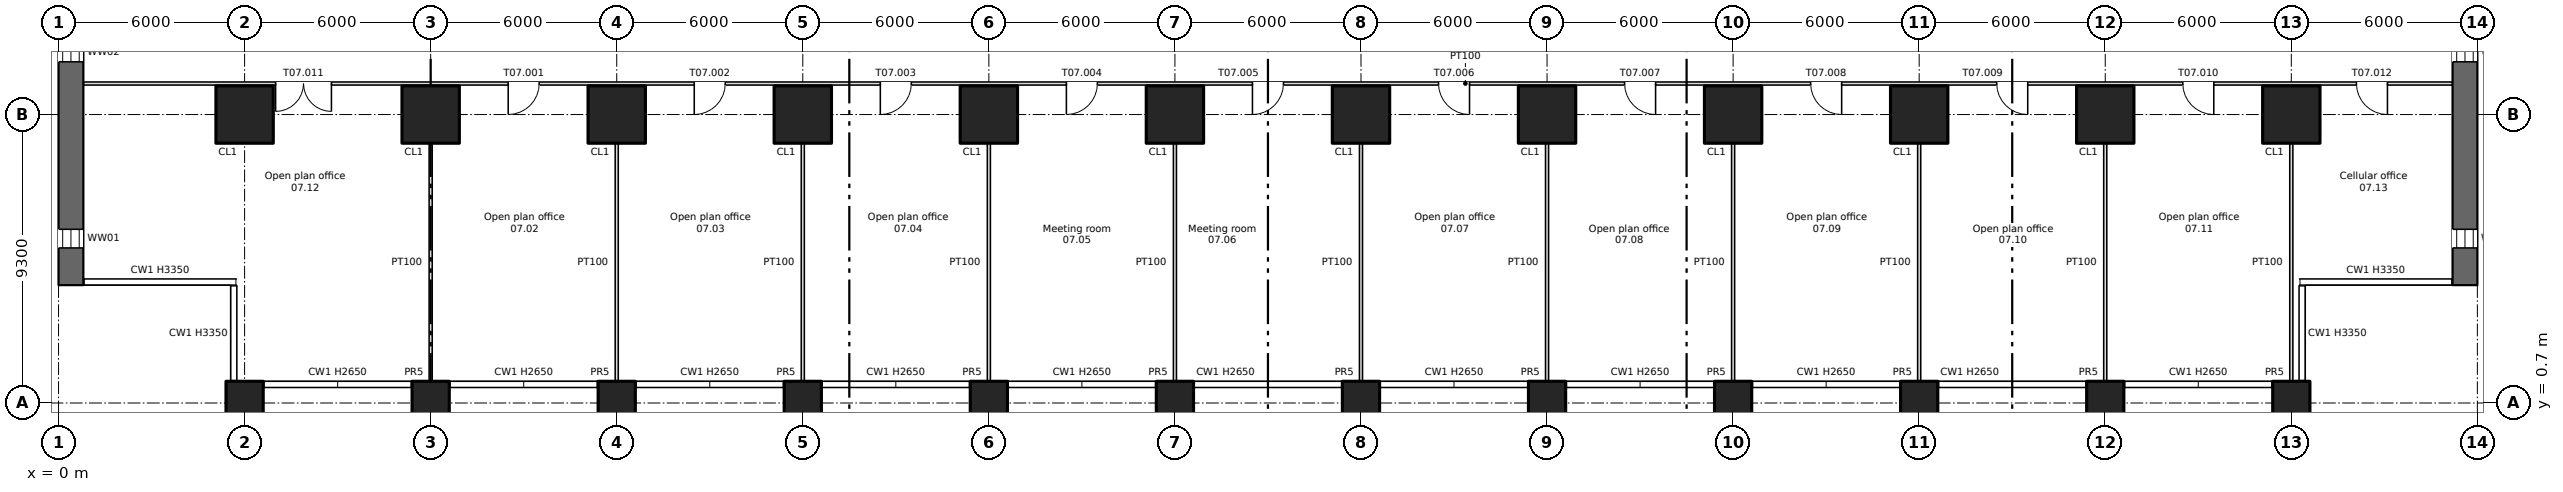
"""IFC4 building model, lengths in metres.
Left out: names, types, materials, properties, quantities, classifications, styles, units other than length and angle.
Written with IfcOpenShell. Run it as: python <this file> out.ifc"""

import sys

from ifc_helpers import new_model, si_unit, direction, frame, frame_2d, origin, origin_2d, place, context, subcontext, project, spatial, rectangle, extrude, element, fill, save


model = new_model("IFC4")
c1 = context("Model", 3, precision=1e-05, world=origin(), true_north=direction((0.0, 1.0)))
c2 = subcontext(c1, "Body", "Model", "MODEL_VIEW")
j1 = project(units=[si_unit("LENGTHUNIT", "METRE"), si_unit("PLANEANGLEUNIT", "RADIAN")], contexts=[c1])
p1 = place(None, origin())
s1 = spatial("IfcSite", under=j1, at=p1, CompositionType="ELEMENT")
p2 = place(p1, origin())
s2 = spatial("IfcBuilding", under=s1, at=p2, CompositionType="ELEMENT")
p3 = place(p2, frame((0.0, 0.0, 26.25)))
s3 = spatial("IfcBuildingStorey", under=s2, at=p3, CompositionType="ELEMENT", Elevation=26.25)
for number, where, z_axis, x_axis in (
    (1, (6.0, 0.7, -0.4), (0.0, 0.0, 1.0), (1.0, 0.0, 0.0)),
    (2, (12.0, 0.7, -0.4), (0.0, 0.0, 1.0), (1.0, 0.0, 0.0)),
    (3, (18.0, 0.7, -0.4), (0.0, 0.0, 1.0), (1.0, 0.0, 0.0)),
    (4, (24.0, 0.7, -0.4), (0.0, 0.0, 1.0), (1.0, 0.0, 0.0)),
    (5, (30.0, 0.7, -0.4), (0.0, 0.0, 1.0), (1.0, 0.0, 0.0)),
    (6, (36.0, 0.7, -0.4), (0.0, 0.0, 1.0), (1.0, 0.0, 0.0)),
    (7, (42.0, 0.7, -0.4), (0.0, 0.0, 1.0), (1.0, 0.0, 0.0)),
    (8, (48.0, 0.7, -0.4), (0.0, 0.0, 1.0), (1.0, 0.0, 0.0)),
    (9, (54.0, 0.7, -0.4), (0.0, 0.0, 1.0), (1.0, 0.0, 0.0)),
    (10, (60.0, 0.7, -0.4), (0.0, 0.0, 1.0), (1.0, 0.0, 0.0)),
    (11, (66.0, 0.7, -0.4), (0.0, 0.0, 1.0), (1.0, 0.0, 0.0)),
    (12, (72.0, 0.7, -0.4), (0.0, 0.0, 1.0), (1.0, 0.0, 0.0)),
):
    element("IfcColumn", number, at=place(p3, frame(where, z_axis=z_axis, x_axis=x_axis)), inside=s3, PredefinedType="COLUMN", context=c2, shape_type="SweptSolid", body=[
        extrude(rectangle(XDim=1.2, YDim=1.4, at=origin_2d()), origin(), (0.0, 0.0, 1.0), 3.75),
    ])
for number, where, z_axis, x_axis in (
    (13, (6.0, 10.0, 0.0), (0.0, 0.0, 1.0), (1.0, 0.0, 0.0)),
    (14, (12.0, 10.0, 0.0), (0.0, 0.0, 1.0), (1.0, 0.0, 0.0)),
    (15, (18.0, 10.0, 0.0), (0.0, 0.0, 1.0), (1.0, 0.0, 0.0)),
    (16, (24.0, 10.0, 0.0), (0.0, 0.0, 1.0), (1.0, 0.0, 0.0)),
    (17, (30.0, 10.0, 0.0), (0.0, 0.0, 1.0), (1.0, 0.0, 0.0)),
    (18, (36.0, 10.0, 0.0), (0.0, 0.0, 1.0), (1.0, 0.0, 0.0)),
    (19, (42.0, 10.0, 0.0), (0.0, 0.0, 1.0), (1.0, 0.0, 0.0)),
    (20, (48.0, 10.0, 0.0), (0.0, 0.0, 1.0), (1.0, 0.0, 0.0)),
    (21, (54.0, 10.0, 0.0), (0.0, 0.0, 1.0), (1.0, 0.0, 0.0)),
    (22, (60.0, 10.0, 0.0), (0.0, 0.0, 1.0), (1.0, 0.0, 0.0)),
    (23, (66.0, 10.0, 0.0), (0.0, 0.0, 1.0), (1.0, 0.0, 0.0)),
    (24, (72.0, 10.0, 0.0), (0.0, 0.0, 1.0), (1.0, 0.0, 0.0)),
):
    element("IfcColumn", number, at=place(p3, frame(where, z_axis=z_axis, x_axis=x_axis)), inside=s3, PredefinedType="COLUMN", context=c2, shape_type="SweptSolid", body=[
        extrude(rectangle(XDim=1.85, YDim=1.85, at=origin_2d()), origin(), (0.0, 0.0, 1.0), 3.35),
    ])
p4 = place(p3, frame((0.4, 4.5, 0.0), z_axis=(0.0, 0.0, 1.0), x_axis=(0.0, 1.0, 0.0)))
e25 = element("IfcWall", 25, at=p4, inside=s3, PredefinedType="SHEAR", context=c2, shape_type="SweptSolid", body=[
    extrude(rectangle(XDim=37.0, YDim=0.8, at=frame_2d((18.5, 0.0))), origin(), (0.0, 0.0, 1.0), 3.35),
])
p5 = place(p4, frame((1.2, 0.0, 0.6)))
e26 = element("IfcOpeningElement", 26, at=p5, cuts=e25, PredefinedType="OPENING", context=c2, shape_type="SweptSolid", body=[
    extrude(rectangle(XDim=0.6, YDim=2.4, at=frame_2d((0.3, 1.2))), frame((0.0, 0.41, 0.0), z_axis=(0.0, -1.0, 0.0), x_axis=(1.0, 0.0, 0.0)), (0.0, 0.0, 1.0), 0.82),
])
p6 = place(p4, frame((7.2, 0.0, 0.6)))
e27 = element("IfcOpeningElement", 27, at=p6, cuts=e25, PredefinedType="OPENING", context=c2, shape_type="SweptSolid", body=[
    extrude(rectangle(XDim=0.6, YDim=2.4, at=frame_2d((0.3, 1.2))), frame((0.0, 0.41, 0.0), z_axis=(0.0, -1.0, 0.0), x_axis=(1.0, 0.0, 0.0)), (0.0, 0.0, 1.0), 0.82),
])
p7 = place(p4, frame((13.2, 0.0, 0.6)))
e28 = element("IfcOpeningElement", 28, at=p7, cuts=e25, PredefinedType="OPENING", context=c2, shape_type="SweptSolid", body=[
    extrude(rectangle(XDim=0.6, YDim=2.4, at=frame_2d((0.3, 1.2))), frame((0.0, 0.41, 0.0), z_axis=(0.0, -1.0, 0.0), x_axis=(1.0, 0.0, 0.0)), (0.0, 0.0, 1.0), 0.82),
])
p8 = place(p4, frame((19.2, 0.0, 0.6)))
e29 = element("IfcOpeningElement", 29, at=p8, cuts=e25, PredefinedType="OPENING", context=c2, shape_type="SweptSolid", body=[
    extrude(rectangle(XDim=0.6, YDim=2.4, at=frame_2d((0.3, 1.2))), frame((0.0, 0.41, 0.0), z_axis=(0.0, -1.0, 0.0), x_axis=(1.0, 0.0, 0.0)), (0.0, 0.0, 1.0), 0.82),
])
p9 = place(p4, frame((25.2, 0.0, 0.6)))
e30 = element("IfcOpeningElement", 30, at=p9, cuts=e25, PredefinedType="OPENING", context=c2, shape_type="SweptSolid", body=[
    extrude(rectangle(XDim=0.6, YDim=2.4, at=frame_2d((0.3, 1.2))), frame((0.0, 0.41, 0.0), z_axis=(0.0, -1.0, 0.0), x_axis=(1.0, 0.0, 0.0)), (0.0, 0.0, 1.0), 0.82),
])
p10 = place(p4, frame((31.2, 0.0, 0.6)))
e31 = element("IfcOpeningElement", 31, at=p10, cuts=e25, PredefinedType="OPENING", context=c2, shape_type="SweptSolid", body=[
    extrude(rectangle(XDim=0.6, YDim=2.4, at=frame_2d((0.3, 1.2))), frame((0.0, 0.41, 0.0), z_axis=(0.0, -1.0, 0.0), x_axis=(1.0, 0.0, 0.0)), (0.0, 0.0, 1.0), 0.82),
])
p11 = place(p3, frame((77.6, 4.5, 0.0), z_axis=(0.0, 0.0, 1.0), x_axis=(0.0, 1.0, 0.0)))
e32 = element("IfcWall", 32, at=p11, inside=s3, PredefinedType="SHEAR", context=c2, shape_type="SweptSolid", body=[
    extrude(rectangle(XDim=37.0, YDim=0.8, at=frame_2d((18.5, 0.0))), origin(), (0.0, 0.0, 1.0), 3.35),
])
p12 = place(p11, frame((1.2, 0.0, 0.6)))
e33 = element("IfcOpeningElement", 33, at=p12, cuts=e32, PredefinedType="OPENING", context=c2, shape_type="SweptSolid", body=[
    extrude(rectangle(XDim=0.6, YDim=2.4, at=frame_2d((0.3, 1.2))), frame((0.0, 0.41, 0.0), z_axis=(0.0, -1.0, 0.0), x_axis=(1.0, 0.0, 0.0)), (0.0, 0.0, 1.0), 0.82),
])
p13 = place(p11, frame((7.2, 0.0, 0.6)))
e34 = element("IfcOpeningElement", 34, at=p13, cuts=e32, PredefinedType="OPENING", context=c2, shape_type="SweptSolid", body=[
    extrude(rectangle(XDim=0.6, YDim=2.4, at=frame_2d((0.3, 1.2))), frame((0.0, 0.41, 0.0), z_axis=(0.0, -1.0, 0.0), x_axis=(1.0, 0.0, 0.0)), (0.0, 0.0, 1.0), 0.82),
])
p14 = place(p11, frame((13.2, 0.0, 0.6)))
e35 = element("IfcOpeningElement", 35, at=p14, cuts=e32, PredefinedType="OPENING", context=c2, shape_type="SweptSolid", body=[
    extrude(rectangle(XDim=0.6, YDim=2.4, at=frame_2d((0.3, 1.2))), frame((0.0, 0.41, 0.0), z_axis=(0.0, -1.0, 0.0), x_axis=(1.0, 0.0, 0.0)), (0.0, 0.0, 1.0), 0.82),
])
p15 = place(p11, frame((19.2, 0.0, 0.6)))
e36 = element("IfcOpeningElement", 36, at=p15, cuts=e32, PredefinedType="OPENING", context=c2, shape_type="SweptSolid", body=[
    extrude(rectangle(XDim=0.6, YDim=2.4, at=frame_2d((0.3, 1.2))), frame((0.0, 0.41, 0.0), z_axis=(0.0, -1.0, 0.0), x_axis=(1.0, 0.0, 0.0)), (0.0, 0.0, 1.0), 0.82),
])
p16 = place(p11, frame((25.2, 0.0, 0.6)))
e37 = element("IfcOpeningElement", 37, at=p16, cuts=e32, PredefinedType="OPENING", context=c2, shape_type="SweptSolid", body=[
    extrude(rectangle(XDim=0.6, YDim=2.4, at=frame_2d((0.3, 1.2))), frame((0.0, 0.41, 0.0), z_axis=(0.0, -1.0, 0.0), x_axis=(1.0, 0.0, 0.0)), (0.0, 0.0, 1.0), 0.82),
])
p17 = place(p11, frame((31.2, 0.0, 0.6)))
e38 = element("IfcOpeningElement", 38, at=p17, cuts=e32, PredefinedType="OPENING", context=c2, shape_type="SweptSolid", body=[
    extrude(rectangle(XDim=0.6, YDim=2.4, at=frame_2d((0.3, 1.2))), frame((0.0, 0.41, 0.0), z_axis=(0.0, -1.0, 0.0), x_axis=(1.0, 0.0, 0.0)), (0.0, 0.0, 1.0), 0.82),
])
p18 = place(p3, frame((0.8, 11.0, 0.0), z_axis=(0.0, 0.0, 1.0), x_axis=(1.0, 0.0, 0.0)))
e39 = element("IfcWall", 39, at=p18, inside=s3, PredefinedType="PARTITIONING", context=c2, shape_type="SweptSolid", body=[
    extrude(rectangle(XDim=76.4, YDim=0.1, at=frame_2d((38.2, 0.0))), origin(), (0.0, 0.0, 1.0), 3.35),
])
p19 = place(p18, frame((13.7, 0.0, 0.0)))
e40 = element("IfcOpeningElement", 40, at=p19, cuts=e39, PredefinedType="OPENING", context=c2, shape_type="SweptSolid", body=[
    extrude(rectangle(XDim=1.0, YDim=2.1, at=frame_2d((0.5, 1.05))), frame((0.0, 0.06, 0.0), z_axis=(0.0, -1.0, 0.0), x_axis=(1.0, 0.0, 0.0)), (0.0, 0.0, 1.0), 0.12),
])
p20 = place(p18, frame((19.7, 0.0, 0.0)))
e41 = element("IfcOpeningElement", 41, at=p20, cuts=e39, PredefinedType="OPENING", context=c2, shape_type="SweptSolid", body=[
    extrude(rectangle(XDim=1.0, YDim=2.1, at=frame_2d((0.5, 1.05))), frame((0.0, 0.06, 0.0), z_axis=(0.0, -1.0, 0.0), x_axis=(1.0, 0.0, 0.0)), (0.0, 0.0, 1.0), 0.12),
])
p21 = place(p18, frame((25.7, 0.0, 0.0)))
e42 = element("IfcOpeningElement", 42, at=p21, cuts=e39, PredefinedType="OPENING", context=c2, shape_type="SweptSolid", body=[
    extrude(rectangle(XDim=1.0, YDim=2.1, at=frame_2d((0.5, 1.05))), frame((0.0, 0.06, 0.0), z_axis=(0.0, -1.0, 0.0), x_axis=(1.0, 0.0, 0.0)), (0.0, 0.0, 1.0), 0.12),
])
p22 = place(p18, frame((31.7, 0.0, 0.0)))
e43 = element("IfcOpeningElement", 43, at=p22, cuts=e39, PredefinedType="OPENING", context=c2, shape_type="SweptSolid", body=[
    extrude(rectangle(XDim=1.0, YDim=2.1, at=frame_2d((0.5, 1.05))), frame((0.0, 0.06, 0.0), z_axis=(0.0, -1.0, 0.0), x_axis=(1.0, 0.0, 0.0)), (0.0, 0.0, 1.0), 0.12),
])
p23 = place(p18, frame((37.7, 0.0, 0.0)))
e44 = element("IfcOpeningElement", 44, at=p23, cuts=e39, PredefinedType="OPENING", context=c2, shape_type="SweptSolid", body=[
    extrude(rectangle(XDim=1.0, YDim=2.1, at=frame_2d((0.5, 1.05))), frame((0.0, 0.06, 0.0), z_axis=(0.0, -1.0, 0.0), x_axis=(1.0, 0.0, 0.0)), (0.0, 0.0, 1.0), 0.12),
])
p24 = place(p18, frame((43.7, 0.0, 0.0)))
e45 = element("IfcOpeningElement", 45, at=p24, cuts=e39, PredefinedType="OPENING", context=c2, shape_type="SweptSolid", body=[
    extrude(rectangle(XDim=1.0, YDim=2.1, at=frame_2d((0.5, 1.05))), frame((0.0, 0.06, 0.0), z_axis=(0.0, -1.0, 0.0), x_axis=(1.0, 0.0, 0.0)), (0.0, 0.0, 1.0), 0.12),
])
p25 = place(p18, frame((49.7, 0.0, 0.0)))
e46 = element("IfcOpeningElement", 46, at=p25, cuts=e39, PredefinedType="OPENING", context=c2, shape_type="SweptSolid", body=[
    extrude(rectangle(XDim=1.0, YDim=2.1, at=frame_2d((0.5, 1.05))), frame((0.0, 0.06, 0.0), z_axis=(0.0, -1.0, 0.0), x_axis=(1.0, 0.0, 0.0)), (0.0, 0.0, 1.0), 0.12),
])
p26 = place(p18, frame((55.7, 0.0, 0.0)))
e47 = element("IfcOpeningElement", 47, at=p26, cuts=e39, PredefinedType="OPENING", context=c2, shape_type="SweptSolid", body=[
    extrude(rectangle(XDim=1.0, YDim=2.1, at=frame_2d((0.5, 1.05))), frame((0.0, 0.06, 0.0), z_axis=(0.0, -1.0, 0.0), x_axis=(1.0, 0.0, 0.0)), (0.0, 0.0, 1.0), 0.12),
])
p27 = place(p18, frame((61.7, 0.0, 0.0)))
e48 = element("IfcOpeningElement", 48, at=p27, cuts=e39, PredefinedType="OPENING", context=c2, shape_type="SweptSolid", body=[
    extrude(rectangle(XDim=1.0, YDim=2.1, at=frame_2d((0.5, 1.05))), frame((0.0, 0.06, 0.0), z_axis=(0.0, -1.0, 0.0), x_axis=(1.0, 0.0, 0.0)), (0.0, 0.0, 1.0), 0.12),
])
p28 = place(p18, frame((67.7, 0.0, 0.0)))
e49 = element("IfcOpeningElement", 49, at=p28, cuts=e39, PredefinedType="OPENING", context=c2, shape_type="SweptSolid", body=[
    extrude(rectangle(XDim=1.0, YDim=2.1, at=frame_2d((0.5, 1.05))), frame((0.0, 0.06, 0.0), z_axis=(0.0, -1.0, 0.0), x_axis=(1.0, 0.0, 0.0)), (0.0, 0.0, 1.0), 0.12),
])
p29 = place(p18, frame((6.2, 0.0, 0.0)))
e50 = element("IfcOpeningElement", 50, at=p29, cuts=e39, PredefinedType="OPENING", context=c2, shape_type="SweptSolid", body=[
    extrude(rectangle(XDim=1.8, YDim=2.1, at=frame_2d((0.9, 1.05))), frame((0.0, 0.06, 0.0), z_axis=(0.0, -1.0, 0.0), x_axis=(1.0, 0.0, 0.0)), (0.0, 0.0, 1.0), 0.12),
])
p30 = place(p18, frame((73.3, 0.0, 0.0)))
e51 = element("IfcOpeningElement", 51, at=p30, cuts=e39, PredefinedType="OPENING", context=c2, shape_type="SweptSolid", body=[
    extrude(rectangle(XDim=1.0, YDim=2.1, at=frame_2d((0.5, 1.05))), frame((0.0, 0.06, 0.0), z_axis=(0.0, -1.0, 0.0), x_axis=(1.0, 0.0, 0.0)), (0.0, 0.0, 1.0), 0.12),
])
for number, where, z_axis, x_axis in (
    (52, (12.0, 1.4, 0.0), (0.0, 0.0, 1.0), (0.0, 1.0, 0.0)),
    (53, (18.0, 1.4, 0.0), (0.0, 0.0, 1.0), (0.0, 1.0, 0.0)),
    (54, (24.0, 1.4, 0.0), (0.0, 0.0, 1.0), (0.0, 1.0, 0.0)),
    (55, (30.0, 1.4, 0.0), (0.0, 0.0, 1.0), (0.0, 1.0, 0.0)),
    (56, (36.0, 1.4, 0.0), (0.0, 0.0, 1.0), (0.0, 1.0, 0.0)),
    (57, (42.0, 1.4, 0.0), (0.0, 0.0, 1.0), (0.0, 1.0, 0.0)),
    (58, (48.0, 1.4, 0.0), (0.0, 0.0, 1.0), (0.0, 1.0, 0.0)),
    (59, (54.0, 1.4, 0.0), (0.0, 0.0, 1.0), (0.0, 1.0, 0.0)),
    (60, (60.0, 1.4, 0.0), (0.0, 0.0, 1.0), (0.0, 1.0, 0.0)),
    (61, (66.0, 1.4, 0.0), (0.0, 0.0, 1.0), (0.0, 1.0, 0.0)),
    (62, (72.0, 1.4, 0.0), (0.0, 0.0, 1.0), (0.0, 1.0, 0.0)),
):
    element("IfcWall", number, at=place(p3, frame(where, z_axis=z_axis, x_axis=x_axis)), inside=s3, PredefinedType="PARTITIONING", context=c2, shape_type="SweptSolid", body=[
        extrude(rectangle(XDim=7.675, YDim=0.1, at=frame_2d((3.837, 0.0))), origin(), (0.0, 0.0, 1.0), 3.35),
    ])
p31 = place(p5, origin())
e63 = element("IfcWindow", 63, at=p31, inside=s3, PartitioningType="SINGLE_PANEL", PredefinedType="WINDOW", context=c2, shape_type="SweptSolid", body=[
    extrude(rectangle(XDim=0.6, YDim=2.4, at=frame_2d((0.3, 1.2))), frame((0.0, 0.03, 0.0), z_axis=(0.0, -1.0, 0.0), x_axis=(1.0, 0.0, 0.0)), (0.0, 0.0, 1.0), 0.06),
])
fill(e26, e63)
p32 = place(p6, origin())
e64 = element("IfcWindow", 64, at=p32, inside=s3, PartitioningType="SINGLE_PANEL", PredefinedType="WINDOW", context=c2, shape_type="SweptSolid", body=[
    extrude(rectangle(XDim=0.6, YDim=2.4, at=frame_2d((0.3, 1.2))), frame((0.0, 0.03, 0.0), z_axis=(0.0, -1.0, 0.0), x_axis=(1.0, 0.0, 0.0)), (0.0, 0.0, 1.0), 0.06),
])
fill(e27, e64)
p33 = place(p12, origin())
e65 = element("IfcWindow", 65, at=p33, inside=s3, PartitioningType="SINGLE_PANEL", PredefinedType="WINDOW", context=c2, shape_type="SweptSolid", body=[
    extrude(rectangle(XDim=0.6, YDim=2.4, at=frame_2d((0.3, 1.2))), frame((0.0, 0.03, 0.0), z_axis=(0.0, -1.0, 0.0), x_axis=(1.0, 0.0, 0.0)), (0.0, 0.0, 1.0), 0.06),
])
fill(e33, e65)
p34 = place(p13, origin())
e66 = element("IfcWindow", 66, at=p34, inside=s3, PartitioningType="SINGLE_PANEL", PredefinedType="WINDOW", context=c2, shape_type="SweptSolid", body=[
    extrude(rectangle(XDim=0.6, YDim=2.4, at=frame_2d((0.3, 1.2))), frame((0.0, 0.03, 0.0), z_axis=(0.0, -1.0, 0.0), x_axis=(1.0, 0.0, 0.0)), (0.0, 0.0, 1.0), 0.06),
])
fill(e34, e66)
p35 = place(p19, origin())
e67 = element("IfcDoor", 67, at=p35, inside=s3, OperationType="SINGLE_SWING_LEFT", PredefinedType="DOOR", context=c2, shape_type="SweptSolid", body=[
    extrude(rectangle(XDim=1.0, YDim=2.1, at=frame_2d((0.5, 1.05))), frame((0.0, 0.025, 0.0), z_axis=(0.0, -1.0, 0.0), x_axis=(1.0, 0.0, 0.0)), (0.0, 0.0, 1.0), 0.05),
])
fill(e40, e67)
p36 = place(p20, origin())
e68 = element("IfcDoor", 68, at=p36, inside=s3, OperationType="SINGLE_SWING_LEFT", PredefinedType="DOOR", context=c2, shape_type="SweptSolid", body=[
    extrude(rectangle(XDim=1.0, YDim=2.1, at=frame_2d((0.5, 1.05))), frame((0.0, 0.025, 0.0), z_axis=(0.0, -1.0, 0.0), x_axis=(1.0, 0.0, 0.0)), (0.0, 0.0, 1.0), 0.05),
])
fill(e41, e68)
p37 = place(p21, origin())
e69 = element("IfcDoor", 69, at=p37, inside=s3, OperationType="SINGLE_SWING_LEFT", PredefinedType="DOOR", context=c2, shape_type="SweptSolid", body=[
    extrude(rectangle(XDim=1.0, YDim=2.1, at=frame_2d((0.5, 1.05))), frame((0.0, 0.025, 0.0), z_axis=(0.0, -1.0, 0.0), x_axis=(1.0, 0.0, 0.0)), (0.0, 0.0, 1.0), 0.05),
])
fill(e42, e69)
p38 = place(p22, origin())
e70 = element("IfcDoor", 70, at=p38, inside=s3, OperationType="SINGLE_SWING_LEFT", PredefinedType="DOOR", context=c2, shape_type="SweptSolid", body=[
    extrude(rectangle(XDim=1.0, YDim=2.1, at=frame_2d((0.5, 1.05))), frame((0.0, 0.025, 0.0), z_axis=(0.0, -1.0, 0.0), x_axis=(1.0, 0.0, 0.0)), (0.0, 0.0, 1.0), 0.05),
])
fill(e43, e70)
p39 = place(p23, origin())
e71 = element("IfcDoor", 71, at=p39, inside=s3, OperationType="SINGLE_SWING_LEFT", PredefinedType="DOOR", context=c2, shape_type="SweptSolid", body=[
    extrude(rectangle(XDim=1.0, YDim=2.1, at=frame_2d((0.5, 1.05))), frame((0.0, 0.025, 0.0), z_axis=(0.0, -1.0, 0.0), x_axis=(1.0, 0.0, 0.0)), (0.0, 0.0, 1.0), 0.05),
])
fill(e44, e71)
p40 = place(p24, origin())
e72 = element("IfcDoor", 72, at=p40, inside=s3, OperationType="SINGLE_SWING_RIGHT", PredefinedType="DOOR", context=c2, shape_type="SweptSolid", body=[
    extrude(rectangle(XDim=1.0, YDim=2.1, at=frame_2d((0.5, 1.05))), frame((0.0, 0.025, 0.0), z_axis=(0.0, -1.0, 0.0), x_axis=(1.0, 0.0, 0.0)), (0.0, 0.0, 1.0), 0.05),
])
fill(e45, e72)
p41 = place(p25, origin())
e73 = element("IfcDoor", 73, at=p41, inside=s3, OperationType="SINGLE_SWING_RIGHT", PredefinedType="DOOR", context=c2, shape_type="SweptSolid", body=[
    extrude(rectangle(XDim=1.0, YDim=2.1, at=frame_2d((0.5, 1.05))), frame((0.0, 0.025, 0.0), z_axis=(0.0, -1.0, 0.0), x_axis=(1.0, 0.0, 0.0)), (0.0, 0.0, 1.0), 0.05),
])
fill(e46, e73)
p42 = place(p26, origin())
e74 = element("IfcDoor", 74, at=p42, inside=s3, OperationType="SINGLE_SWING_RIGHT", PredefinedType="DOOR", context=c2, shape_type="SweptSolid", body=[
    extrude(rectangle(XDim=1.0, YDim=2.1, at=frame_2d((0.5, 1.05))), frame((0.0, 0.025, 0.0), z_axis=(0.0, -1.0, 0.0), x_axis=(1.0, 0.0, 0.0)), (0.0, 0.0, 1.0), 0.05),
])
fill(e47, e74)
p43 = place(p27, origin())
e75 = element("IfcDoor", 75, at=p43, inside=s3, OperationType="SINGLE_SWING_RIGHT", PredefinedType="DOOR", context=c2, shape_type="SweptSolid", body=[
    extrude(rectangle(XDim=1.0, YDim=2.1, at=frame_2d((0.5, 1.05))), frame((0.0, 0.025, 0.0), z_axis=(0.0, -1.0, 0.0), x_axis=(1.0, 0.0, 0.0)), (0.0, 0.0, 1.0), 0.05),
])
fill(e48, e75)
p44 = place(p28, origin())
e76 = element("IfcDoor", 76, at=p44, inside=s3, OperationType="SINGLE_SWING_RIGHT", PredefinedType="DOOR", context=c2, shape_type="SweptSolid", body=[
    extrude(rectangle(XDim=1.0, YDim=2.1, at=frame_2d((0.5, 1.05))), frame((0.0, 0.025, 0.0), z_axis=(0.0, -1.0, 0.0), x_axis=(1.0, 0.0, 0.0)), (0.0, 0.0, 1.0), 0.05),
])
fill(e49, e76)
p45 = place(p29, origin())
e77 = element("IfcDoor", 77, at=p45, inside=s3, OperationType="DOUBLE_DOOR_SINGLE_SWING", PredefinedType="DOOR", context=c2, shape_type="SweptSolid", body=[
    extrude(rectangle(XDim=1.8, YDim=2.1, at=frame_2d((0.9, 1.05))), frame((0.0, 0.025, 0.0), z_axis=(0.0, -1.0, 0.0), x_axis=(1.0, 0.0, 0.0)), (0.0, 0.0, 1.0), 0.05),
])
fill(e50, e77)
p46 = place(p30, origin())
e78 = element("IfcDoor", 78, at=p46, inside=s3, OperationType="SINGLE_SWING_RIGHT", PredefinedType="DOOR", context=c2, shape_type="SweptSolid", body=[
    extrude(rectangle(XDim=1.0, YDim=2.1, at=frame_2d((0.5, 1.05))), frame((0.0, 0.025, 0.0), z_axis=(0.0, -1.0, 0.0), x_axis=(1.0, 0.0, 0.0)), (0.0, 0.0, 1.0), 0.05),
])
fill(e51, e78)
save(model, sys.argv[1])
